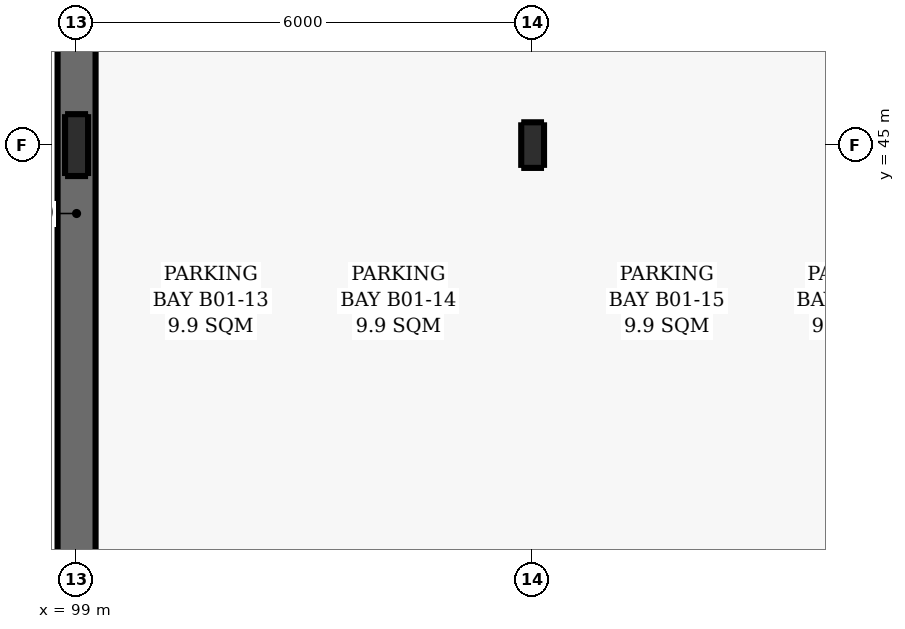
"""IFC4 building model, lengths in metres.
Left out: names, types, materials, properties, quantities, classifications, styles, units other than length and angle.
Written with IfcOpenShell. Run it as: python <this file> out.ifc"""

import sys

from ifc_helpers import new_model, si_unit, direction, frame, frame_2d, origin, origin_2d, place, context, subcontext, project, spatial, rectangle, i_section, extrude, element, save


model = new_model("IFC4")
c1 = context("Model", 3, precision=1e-05, world=origin(), true_north=direction((0.0, 1.0)))
c2 = subcontext(c1, "Body", "Model", "MODEL_VIEW")
j1 = project(units=[si_unit("LENGTHUNIT", "METRE"), si_unit("PLANEANGLEUNIT", "RADIAN")], contexts=[c1])
p1 = place(None, origin())
s1 = spatial("IfcSite", under=j1, at=p1, CompositionType="ELEMENT")
p2 = place(p1, origin())
s2 = spatial("IfcBuilding", under=s1, at=p2, CompositionType="ELEMENT")
p3 = place(p2, frame((0.0, 0.0, -4.8)))
s3 = spatial("IfcBuildingStorey", under=s2, at=p3, CompositionType="ELEMENT", Elevation=-4.8)
p4 = place(p3, frame((99.0, 45.0, 0.0), z_axis=(0.0, 0.0, 1.0), x_axis=(1.0, 0.0, 0.0)))
e1 = element("IfcColumn", 1, at=p4, inside=s3, PredefinedType="COLUMN", context=c2, shape_type="SweptSolid", body=[
    extrude(i_section(OverallWidth=0.303, OverallDepth=0.814, WebThickness=0.021, FlangeThickness=0.04, FilletRadius=0.03, at=origin_2d()), origin(), (0.0, 0.0, 1.0), 4.8),
])
p5 = place(p3, frame((105.0, 45.0, 0.0), z_axis=(0.0, 0.0, 1.0), x_axis=(1.0, 0.0, 0.0)))
e2 = element("IfcColumn", 2, at=p5, inside=s3, PredefinedType="COLUMN", context=c2, shape_type="SweptSolid", body=[
    extrude(i_section(OverallWidth=0.3, OverallDepth=0.6, WebThickness=0.015, FlangeThickness=0.03, FilletRadius=0.027, at=origin_2d()), origin(), (0.0, 0.0, 1.0), 4.8),
])
p6 = place(p3, frame((99.0, 36.0, 0.0), z_axis=(0.0, 0.0, 1.0), x_axis=(0.0, 1.0, 0.0)))
e3 = element("IfcWall", 3, at=p6, inside=s3, PredefinedType="SOLIDWALL", context=c2, shape_type="SweptSolid", body=[
    extrude(rectangle(XDim=16.2, YDim=0.5, at=frame_2d((8.1, 0.0))), origin(), (0.0, 0.0, 1.0), 4.5),
])
save(model, sys.argv[1])
